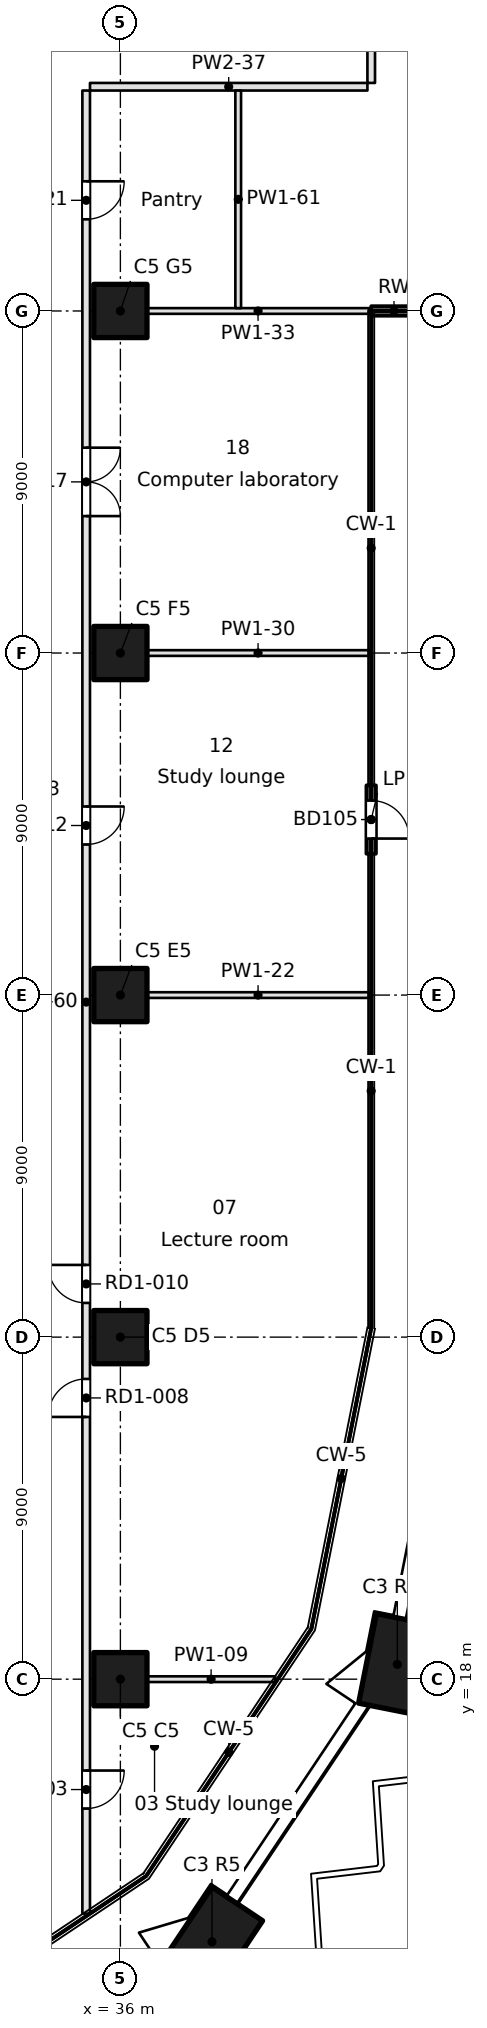
"""IFC4 building model, lengths in metres.
Left out: names, types, materials, properties, quantities, classifications, styles, units other than length and angle.
Written with IfcOpenShell. Run it as: python <this file> out.ifc"""

import sys

from ifc_helpers import new_model, si_unit, direction, frame, frame_2d, origin, origin_2d, place, context, subcontext, project, spatial, rectangle, extrude, element, fill, save


model = new_model("IFC4")
c1 = context("Model", 3, precision=1e-05, world=origin(), true_north=direction((0.0, 1.0)))
c2 = subcontext(c1, "Body", "Model", "MODEL_VIEW")
j1 = project(units=[si_unit("LENGTHUNIT", "METRE"), si_unit("PLANEANGLEUNIT", "RADIAN")], contexts=[c1])
p1 = place(None, origin())
s1 = spatial("IfcSite", under=j1, at=p1, CompositionType="ELEMENT")
p2 = place(p1, origin())
s2 = spatial("IfcBuilding", under=s1, at=p2, CompositionType="ELEMENT")
p3 = place(p2, frame((0.0, 0.0, 58.0)))
s3 = spatial("IfcBuildingStorey", under=s2, at=p3, CompositionType="ELEMENT", Elevation=58.0)
for number, where, z_axis, x_axis in (
    (1, (38.41, 11.09, 0.0), (0.0, 0.0, 1.0), (0.556, 0.831, 0.0)),
    (2, (43.287, 18.39, 0.0), (0.0, 0.0, 1.0), (0.195, 0.981, 0.0)),
):
    element("IfcColumn", number, at=place(p3, frame(where, z_axis=z_axis, x_axis=x_axis)), inside=s3, PredefinedType="COLUMN", context=c2, shape_type="SweptSolid", body=[
        extrude(rectangle(XDim=2.4, YDim=1.6, at=origin_2d()), origin(), (0.0, 0.0, 1.0), 3.7),
    ])
for number, where, z_axis, x_axis in (
    (3, (36.0, 18.0, 0.0), (0.0, 0.0, 1.0), (1.0, 0.0, 0.0)),
    (4, (36.0, 27.0, 0.0), (0.0, 0.0, 1.0), (1.0, 0.0, 0.0)),
    (5, (36.0, 36.0, 0.0), (0.0, 0.0, 1.0), (1.0, 0.0, 0.0)),
    (6, (36.0, 45.0, 0.0), (0.0, 0.0, 1.0), (1.0, 0.0, 0.0)),
    (7, (36.0, 54.0, 0.0), (0.0, 0.0, 1.0), (1.0, 0.0, 0.0)),
):
    element("IfcColumn", number, at=place(p3, frame(where, z_axis=z_axis, x_axis=x_axis)), inside=s3, PredefinedType="COLUMN", context=c2, shape_type="SweptSolid", body=[
        extrude(rectangle(XDim=1.4, YDim=1.4, at=origin_2d()), origin(), (0.0, 0.0, 1.0), 3.7),
    ])
p4 = place(p3, frame((42.599, 39.718, 0.0), z_axis=(0.0, 0.0, 1.0), x_axis=(0.0, 1.0, 0.0)))
e8 = element("IfcWall", 8, at=p4, inside=s3, PredefinedType="SOLIDWALL", context=c2, shape_type="SweptSolid", body=[
    extrude(rectangle(XDim=1.8, YDim=0.25, at=frame_2d((0.9, 0.0))), origin(), (0.0, 0.0, 1.0), 3.3),
])
p5 = place(p4, frame((0.4, 0.0, 0.0)))
e9 = element("IfcOpeningElement", 9, at=p5, cuts=e8, PredefinedType="OPENING", context=c2, shape_type="SweptSolid", body=[
    extrude(rectangle(XDim=1.0, YDim=2.1, at=frame_2d((0.5, 1.05))), frame((0.0, 0.125, 0.0), z_axis=(0.0, -1.0, 0.0), x_axis=(1.0, 0.0, 0.0)), (0.0, 0.0, 1.0), 0.25),
])
p6 = place(p3, frame((42.599, 54.0, 0.0), z_axis=(0.0, 0.0, 1.0), x_axis=(0.999999917344, 0.000406586671, 0.0)))
e10 = element("IfcWall", 10, at=p6, inside=s3, PredefinedType="SOLIDWALL", context=c2, shape_type="SweptSolid", body=[
    extrude(rectangle(XDim=1.201, YDim=0.25, at=frame_2d((0.601, 0.0))), origin(), (0.0, 0.0, 1.0), 3.3),
])
p7 = place(p3, frame((36.7, 18.0, 0.0), z_axis=(0.0, 0.0, 1.0), x_axis=(1.0, 0.0, 0.0)))
e11 = element("IfcWall", 11, at=p7, inside=s3, PredefinedType="PARTITIONING", context=c2, shape_type="SweptSolid", body=[
    extrude(rectangle(XDim=3.375, YDim=0.15, at=frame_2d((1.687, 0.0))), origin(), (0.0, 0.0, 1.0), 3.3),
])
for number, where, z_axis, x_axis in (
    (12, (36.7, 36.0, 0.0), (0.0, 0.0, 1.0), (1.0, 0.0, 0.0)),
    (13, (36.7, 45.0, 0.0), (0.0, 0.0, 1.0), (1.0, 0.0, 0.0)),
    (14, (36.7, 54.0, 0.0), (0.0, 0.0, 1.0), (1.0, 0.0, 0.0)),
):
    element("IfcWall", number, at=place(p3, frame(where, z_axis=z_axis, x_axis=x_axis)), inside=s3, PredefinedType="PARTITIONING", context=c2, shape_type="SweptSolid", body=[
        extrude(rectangle(XDim=5.845, YDim=0.15, at=frame_2d((2.922, 0.0))), origin(), (0.0, 0.0, 1.0), 3.3),
    ])
p8 = place(p3, frame((42.5, 59.9, 0.0), z_axis=(0.0, 0.0, 1.0), x_axis=(-1.0, 0.0, 0.0)))
e15 = element("IfcWall", 15, at=p8, inside=s3, PredefinedType="PARTITIONING", context=c2, shape_type="SweptSolid", body=[
    extrude(rectangle(XDim=7.3, YDim=0.2, at=frame_2d((3.65, 0.0))), origin(), (0.0, 0.0, 1.0), 3.3),
])
p9 = place(p3, frame((35.1, 59.8, 0.0), z_axis=(0.0, 0.0, 1.0), x_axis=(0.0, -1.0, 0.0)))
e16 = element("IfcWall", 16, at=p9, inside=s3, PredefinedType="PARTITIONING", context=c2, shape_type="SweptSolid", body=[
    extrude(rectangle(XDim=47.969, YDim=0.2, at=frame_2d((23.984, 0.0))), origin(), (0.0, 0.0, 1.0), 3.3),
])
p10 = place(p9, frame((44.204, 0.0, 0.0)))
e17 = element("IfcOpeningElement", 17, at=p10, cuts=e16, PredefinedType="OPENING", context=c2, shape_type="SweptSolid", body=[
    extrude(rectangle(XDim=1.0, YDim=2.1, at=frame_2d((0.5, 1.05))), frame((0.0, 0.1, 0.0), z_axis=(0.0, -1.0, 0.0), x_axis=(1.0, 0.0, 0.0)), (0.0, 0.0, 1.0), 0.2),
])
p11 = place(p9, frame((33.9, 0.0, 0.0)))
e18 = element("IfcOpeningElement", 18, at=p11, cuts=e16, PredefinedType="OPENING", context=c2, shape_type="SweptSolid", body=[
    extrude(rectangle(XDim=1.0, YDim=2.1, at=frame_2d((0.5, 1.05))), frame((0.0, 0.1, 0.0), z_axis=(0.0, -1.0, 0.0), x_axis=(1.0, 0.0, 0.0)), (0.0, 0.0, 1.0), 0.2),
])
p12 = place(p9, frame((30.9, 0.0, 0.0)))
e19 = element("IfcOpeningElement", 19, at=p12, cuts=e16, PredefinedType="OPENING", context=c2, shape_type="SweptSolid", body=[
    extrude(rectangle(XDim=1.0, YDim=2.1, at=frame_2d((0.5, 1.05))), frame((0.0, 0.1, 0.0), z_axis=(0.0, -1.0, 0.0), x_axis=(1.0, 0.0, 0.0)), (0.0, 0.0, 1.0), 0.2),
])
p13 = place(p9, frame((18.838, 0.0, 0.0)))
e20 = element("IfcOpeningElement", 20, at=p13, cuts=e16, PredefinedType="OPENING", context=c2, shape_type="SweptSolid", body=[
    extrude(rectangle(XDim=1.0, YDim=2.1, at=frame_2d((0.5, 1.05))), frame((0.0, 0.1, 0.0), z_axis=(0.0, -1.0, 0.0), x_axis=(1.0, 0.0, 0.0)), (0.0, 0.0, 1.0), 0.2),
])
p14 = place(p9, frame((9.397, 0.0, 0.0)))
e21 = element("IfcOpeningElement", 21, at=p14, cuts=e16, PredefinedType="OPENING", context=c2, shape_type="SweptSolid", body=[
    extrude(rectangle(XDim=1.8, YDim=2.1, at=frame_2d((0.9, 1.05))), frame((0.0, 0.1, 0.0), z_axis=(0.0, -1.0, 0.0), x_axis=(1.0, 0.0, 0.0)), (0.0, 0.0, 1.0), 0.2),
])
p15 = place(p9, frame((2.388, 0.0, 0.0)))
e22 = element("IfcOpeningElement", 22, at=p15, cuts=e16, PredefinedType="OPENING", context=c2, shape_type="SweptSolid", body=[
    extrude(rectangle(XDim=1.0, YDim=2.1, at=frame_2d((0.5, 1.05))), frame((0.0, 0.1, 0.0), z_axis=(0.0, -1.0, 0.0), x_axis=(1.0, 0.0, 0.0)), (0.0, 0.0, 1.0), 0.2),
])
p16 = place(p3, frame((39.1, 59.8, 0.0), z_axis=(0.0, 0.0, 1.0), x_axis=(0.0, -1.0, 0.0)))
e23 = element("IfcWall", 23, at=p16, inside=s3, PredefinedType="PARTITIONING", context=c2, shape_type="SweptSolid", body=[
    extrude(rectangle(XDim=5.725, YDim=0.15, at=frame_2d((2.863, 0.0))), origin(), (0.0, 0.0, 1.0), 3.3),
])
p17 = place(p3, frame((42.6, 63.6, 0.0), z_axis=(0.0, 0.0, 1.0), x_axis=(0.0, -1.0, 0.0)))
e24 = element("IfcWall", 24, at=p17, inside=s3, PredefinedType="PARTITIONING", context=c2, shape_type="SweptSolid", body=[
    extrude(rectangle(XDim=3.6, YDim=0.2, at=frame_2d((1.8, 0.0))), origin(), (0.0, 0.0, 1.0), 3.3),
])
p18 = place(p5, frame((1.0, 0.0, 0.0), z_axis=(0.0, 0.0, 1.0), x_axis=(-1.0, 0.0, 0.0)))
e25 = element("IfcDoor", 25, at=p18, inside=s3, OperationType="SINGLE_SWING_RIGHT", PredefinedType="DOOR", context=c2, shape_type="SweptSolid", body=[
    extrude(rectangle(XDim=1.0, YDim=2.1, at=frame_2d((0.5, 1.05))), frame((0.0, 0.025, 0.0), z_axis=(0.0, -1.0, 0.0), x_axis=(1.0, 0.0, 0.0)), (0.0, 0.0, 1.0), 0.05),
])
fill(e9, e25)
p19 = place(p10, origin())
e26 = element("IfcDoor", 26, at=p19, inside=s3, OperationType="SINGLE_SWING_LEFT", PredefinedType="DOOR", context=c2, shape_type="SweptSolid", body=[
    extrude(rectangle(XDim=1.0, YDim=2.1, at=frame_2d((0.5, 1.05))), frame((0.0, 0.025, 0.0), z_axis=(0.0, -1.0, 0.0), x_axis=(1.0, 0.0, 0.0)), (0.0, 0.0, 1.0), 0.05),
])
fill(e17, e26)
p20 = place(p11, frame((1.0, 0.0, 0.0), z_axis=(0.0, 0.0, 1.0), x_axis=(-1.0, 0.0, 0.0)))
e27 = element("IfcDoor", 27, at=p20, inside=s3, OperationType="SINGLE_SWING_LEFT", PredefinedType="DOOR", context=c2, shape_type="SweptSolid", body=[
    extrude(rectangle(XDim=1.0, YDim=2.1, at=frame_2d((0.5, 1.05))), frame((0.0, 0.025, 0.0), z_axis=(0.0, -1.0, 0.0), x_axis=(1.0, 0.0, 0.0)), (0.0, 0.0, 1.0), 0.05),
])
fill(e18, e27)
p21 = place(p12, frame((1.0, 0.0, 0.0), z_axis=(0.0, 0.0, 1.0), x_axis=(-1.0, 0.0, 0.0)))
e28 = element("IfcDoor", 28, at=p21, inside=s3, OperationType="SINGLE_SWING_RIGHT", PredefinedType="DOOR", context=c2, shape_type="SweptSolid", body=[
    extrude(rectangle(XDim=1.0, YDim=2.1, at=frame_2d((0.5, 1.05))), frame((0.0, 0.025, 0.0), z_axis=(0.0, -1.0, 0.0), x_axis=(1.0, 0.0, 0.0)), (0.0, 0.0, 1.0), 0.05),
])
fill(e19, e28)
p22 = place(p13, origin())
e29 = element("IfcDoor", 29, at=p22, inside=s3, OperationType="SINGLE_SWING_LEFT", PredefinedType="DOOR", context=c2, shape_type="SweptSolid", body=[
    extrude(rectangle(XDim=1.0, YDim=2.1, at=frame_2d((0.5, 1.05))), frame((0.0, 0.025, 0.0), z_axis=(0.0, -1.0, 0.0), x_axis=(1.0, 0.0, 0.0)), (0.0, 0.0, 1.0), 0.05),
])
fill(e20, e29)
p23 = place(p14, origin())
e30 = element("IfcDoor", 30, at=p23, inside=s3, OperationType="DOUBLE_DOOR_SINGLE_SWING", PredefinedType="DOOR", context=c2, shape_type="SweptSolid", body=[
    extrude(rectangle(XDim=1.8, YDim=2.1, at=frame_2d((0.9, 1.05))), frame((0.0, 0.025, 0.0), z_axis=(0.0, -1.0, 0.0), x_axis=(1.0, 0.0, 0.0)), (0.0, 0.0, 1.0), 0.05),
])
fill(e21, e30)
p24 = place(p15, origin())
e31 = element("IfcDoor", 31, at=p24, inside=s3, OperationType="SINGLE_SWING_LEFT", PredefinedType="DOOR", context=c2, shape_type="SweptSolid", body=[
    extrude(rectangle(XDim=1.0, YDim=2.1, at=frame_2d((0.5, 1.05))), frame((0.0, 0.025, 0.0), z_axis=(0.0, -1.0, 0.0), x_axis=(1.0, 0.0, 0.0)), (0.0, 0.0, 1.0), 0.05),
])
fill(e22, e31)
save(model, sys.argv[1])
